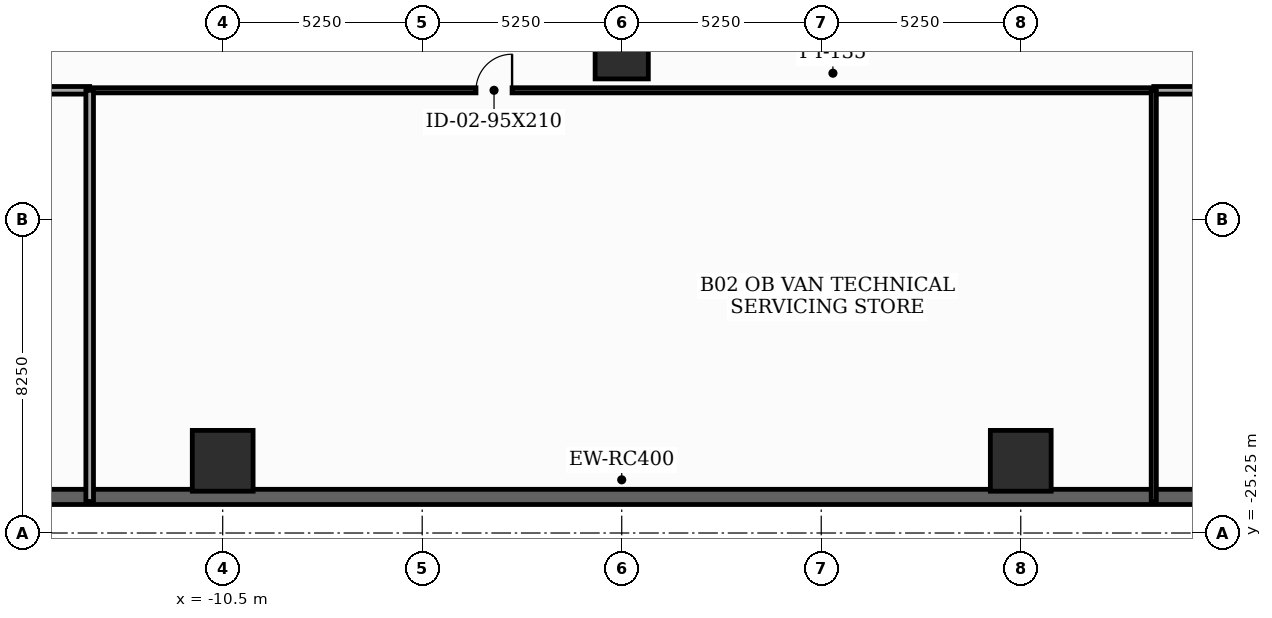
"""IFC4 building model, lengths in metres.
Left out: names, types, materials, properties, quantities, classifications, styles, units other than length and angle.
Written with IfcOpenShell. Run it as: python <this file> out.ifc"""

import sys

from ifc_helpers import new_model, si_unit, direction, frame, frame_2d, origin, origin_2d, place, context, subcontext, project, spatial, rectangle, extrude, element, fill, save


model = new_model("IFC4")
c1 = context("Model", 3, precision=1e-05, world=origin(), true_north=direction((0.0, 1.0)))
c2 = subcontext(c1, "Body", "Model", "MODEL_VIEW")
j1 = project(units=[si_unit("LENGTHUNIT", "METRE"), si_unit("PLANEANGLEUNIT", "RADIAN")], contexts=[c1])
p1 = place(None, origin())
s1 = spatial("IfcSite", under=j1, at=p1, CompositionType="ELEMENT")
p2 = place(p1, origin())
s2 = spatial("IfcBuilding", under=s1, at=p2, CompositionType="ELEMENT")
p3 = place(p2, frame((0.0, 0.0, -9.6)))
s3 = spatial("IfcBuildingStorey", under=s2, at=p3, CompositionType="ELEMENT", Elevation=-9.6)
p4 = place(p3, frame((0.0, -12.6, 0.0), z_axis=(0.0, 0.0, 1.0), x_axis=(1.0, 0.0, 0.0)))
e1 = element("IfcColumn", 1, at=p4, inside=s3, PredefinedType="COLUMN", context=c2, shape_type="SweptSolid", body=[
    extrude(rectangle(XDim=1.4, YDim=1.4, at=origin_2d()), origin(), (0.0, 0.0, 1.0), 4.8),
])
for number, where, z_axis, x_axis in (
    (2, (-10.5, -23.35, 0.0), (0.0, 0.0, 1.0), (1.0, 0.0, 0.0)),
    (3, (10.5, -23.35, 0.0), (0.0, 0.0, 1.0), (1.0, 0.0, 0.0)),
):
    element("IfcColumn", number, at=place(p3, frame(where, z_axis=z_axis, x_axis=x_axis)), inside=s3, PredefinedType="COLUMN", context=c2, shape_type="SweptSolid", body=[
        extrude(rectangle(XDim=1.6, YDim=1.6, at=origin_2d()), origin(), (0.0, 0.0, 1.0), 4.8),
    ])
p5 = place(p3, frame((-32.0, -24.3, 0.0), z_axis=(0.0, 0.0, 1.0), x_axis=(1.0, 0.0, 0.0)))
e4 = element("IfcWall", 4, at=p5, inside=s3, PredefinedType="USERDEFINED", context=c2, shape_type="SweptSolid", body=[
    extrude(rectangle(XDim=64.0, YDim=0.4, at=frame_2d((32.0, 0.0))), origin(), (0.0, 0.0, 1.0), 4.52),
])
p6 = place(p3, frame((-30.5, -13.6, 0.0), z_axis=(0.0, 0.0, 1.0), x_axis=(1.0, 0.0, 0.0)))
e5 = element("IfcWall", 5, at=p6, inside=s3, PredefinedType="SOLIDWALL", context=c2, shape_type="SweptSolid", body=[
    extrude(rectangle(XDim=16.5, YDim=0.2, at=frame_2d((8.25, 0.0))), origin(), (0.0, 0.0, 1.0), 3.305),
])
p7 = place(p6, frame((7.775, 0.0, 0.0)))
e6 = element("IfcOpeningElement", 6, at=p7, cuts=e5, PredefinedType="OPENING", context=c2, shape_type="SweptSolid", body=[
    extrude(rectangle(XDim=0.95, YDim=2.1, at=frame_2d((0.475, 1.05))), frame((0.0, 0.11, 0.0), z_axis=(0.0, -1.0, 0.0), x_axis=(1.0, 0.0, 0.0)), (0.0, 0.0, 1.0), 0.22),
])
p8 = place(p3, frame((-14.0, -13.6, 0.0), z_axis=(0.0, 0.0, 1.0), x_axis=(1.0, 0.0, 0.0)))
e7 = element("IfcWall", 7, at=p8, inside=s3, PredefinedType="PARTITIONING", context=c2, shape_type="SweptSolid", body=[
    extrude(rectangle(XDim=28.0, YDim=0.135, at=frame_2d((14.0, 0.0))), origin(), (0.0, 0.0, 1.0), 3.305),
])
p9 = place(p8, frame((10.165, 0.0, 0.0)))
e8 = element("IfcOpeningElement", 8, at=p9, cuts=e7, PredefinedType="OPENING", context=c2, shape_type="SweptSolid", body=[
    extrude(rectangle(XDim=0.95, YDim=2.1, at=frame_2d((0.475, 1.05))), frame((0.0, 0.077, 0.0), z_axis=(0.0, -1.0, 0.0), x_axis=(1.0, 0.0, 0.0)), (0.0, 0.0, 1.0), 0.155),
])
p10 = place(p3, frame((14.0, -13.6, 0.0), z_axis=(0.0, 0.0, 1.0), x_axis=(1.0, 0.0, 0.0)))
e9 = element("IfcWall", 9, at=p10, inside=s3, PredefinedType="SOLIDWALL", context=c2, shape_type="SweptSolid", body=[
    extrude(rectangle(XDim=16.5, YDim=0.2, at=frame_2d((8.25, 0.0))), origin(), (0.0, 0.0, 1.0), 3.305),
])
p11 = place(p10, frame((7.775, 0.0, 0.0)))
e10 = element("IfcOpeningElement", 10, at=p11, cuts=e9, PredefinedType="OPENING", context=c2, shape_type="SweptSolid", body=[
    extrude(rectangle(XDim=0.95, YDim=2.1, at=frame_2d((0.475, 1.05))), frame((0.0, 0.11, 0.0), z_axis=(0.0, -1.0, 0.0), x_axis=(1.0, 0.0, 0.0)), (0.0, 0.0, 1.0), 0.22),
])
p12 = place(p3, frame((-14.0, -24.42, 0.0), z_axis=(0.0, 0.0, 1.0), x_axis=(0.0, 1.0, 0.0)))
e11 = element("IfcWall", 11, at=p12, inside=s3, PredefinedType="SOLIDWALL", context=c2, shape_type="SweptSolid", body=[
    extrude(rectangle(XDim=10.82, YDim=0.2, at=frame_2d((5.41, 0.0))), origin(), (0.0, 0.0, 1.0), 3.305),
])
p13 = place(p3, frame((14.0, -24.42, 0.0), z_axis=(0.0, 0.0, 1.0), x_axis=(0.0, 1.0, 0.0)))
e12 = element("IfcWall", 12, at=p13, inside=s3, PredefinedType="PARTITIONING", context=c2, shape_type="SweptSolid", body=[
    extrude(rectangle(XDim=10.82, YDim=0.135, at=frame_2d((5.41, 0.0))), origin(), (0.0, 0.0, 1.0), 3.305),
])
p14 = place(p9, origin())
e13 = element("IfcDoor", 13, at=p14, inside=s3, OperationType="SINGLE_SWING_RIGHT", PredefinedType="DOOR", context=c2, shape_type="SweptSolid", body=[
    extrude(rectangle(XDim=0.95, YDim=2.1, at=frame_2d((0.475, 1.05))), frame((0.0, 0.025, 0.0), z_axis=(0.0, -1.0, 0.0), x_axis=(1.0, 0.0, 0.0)), (0.0, 0.0, 1.0), 0.05),
])
fill(e8, e13)
save(model, sys.argv[1])
